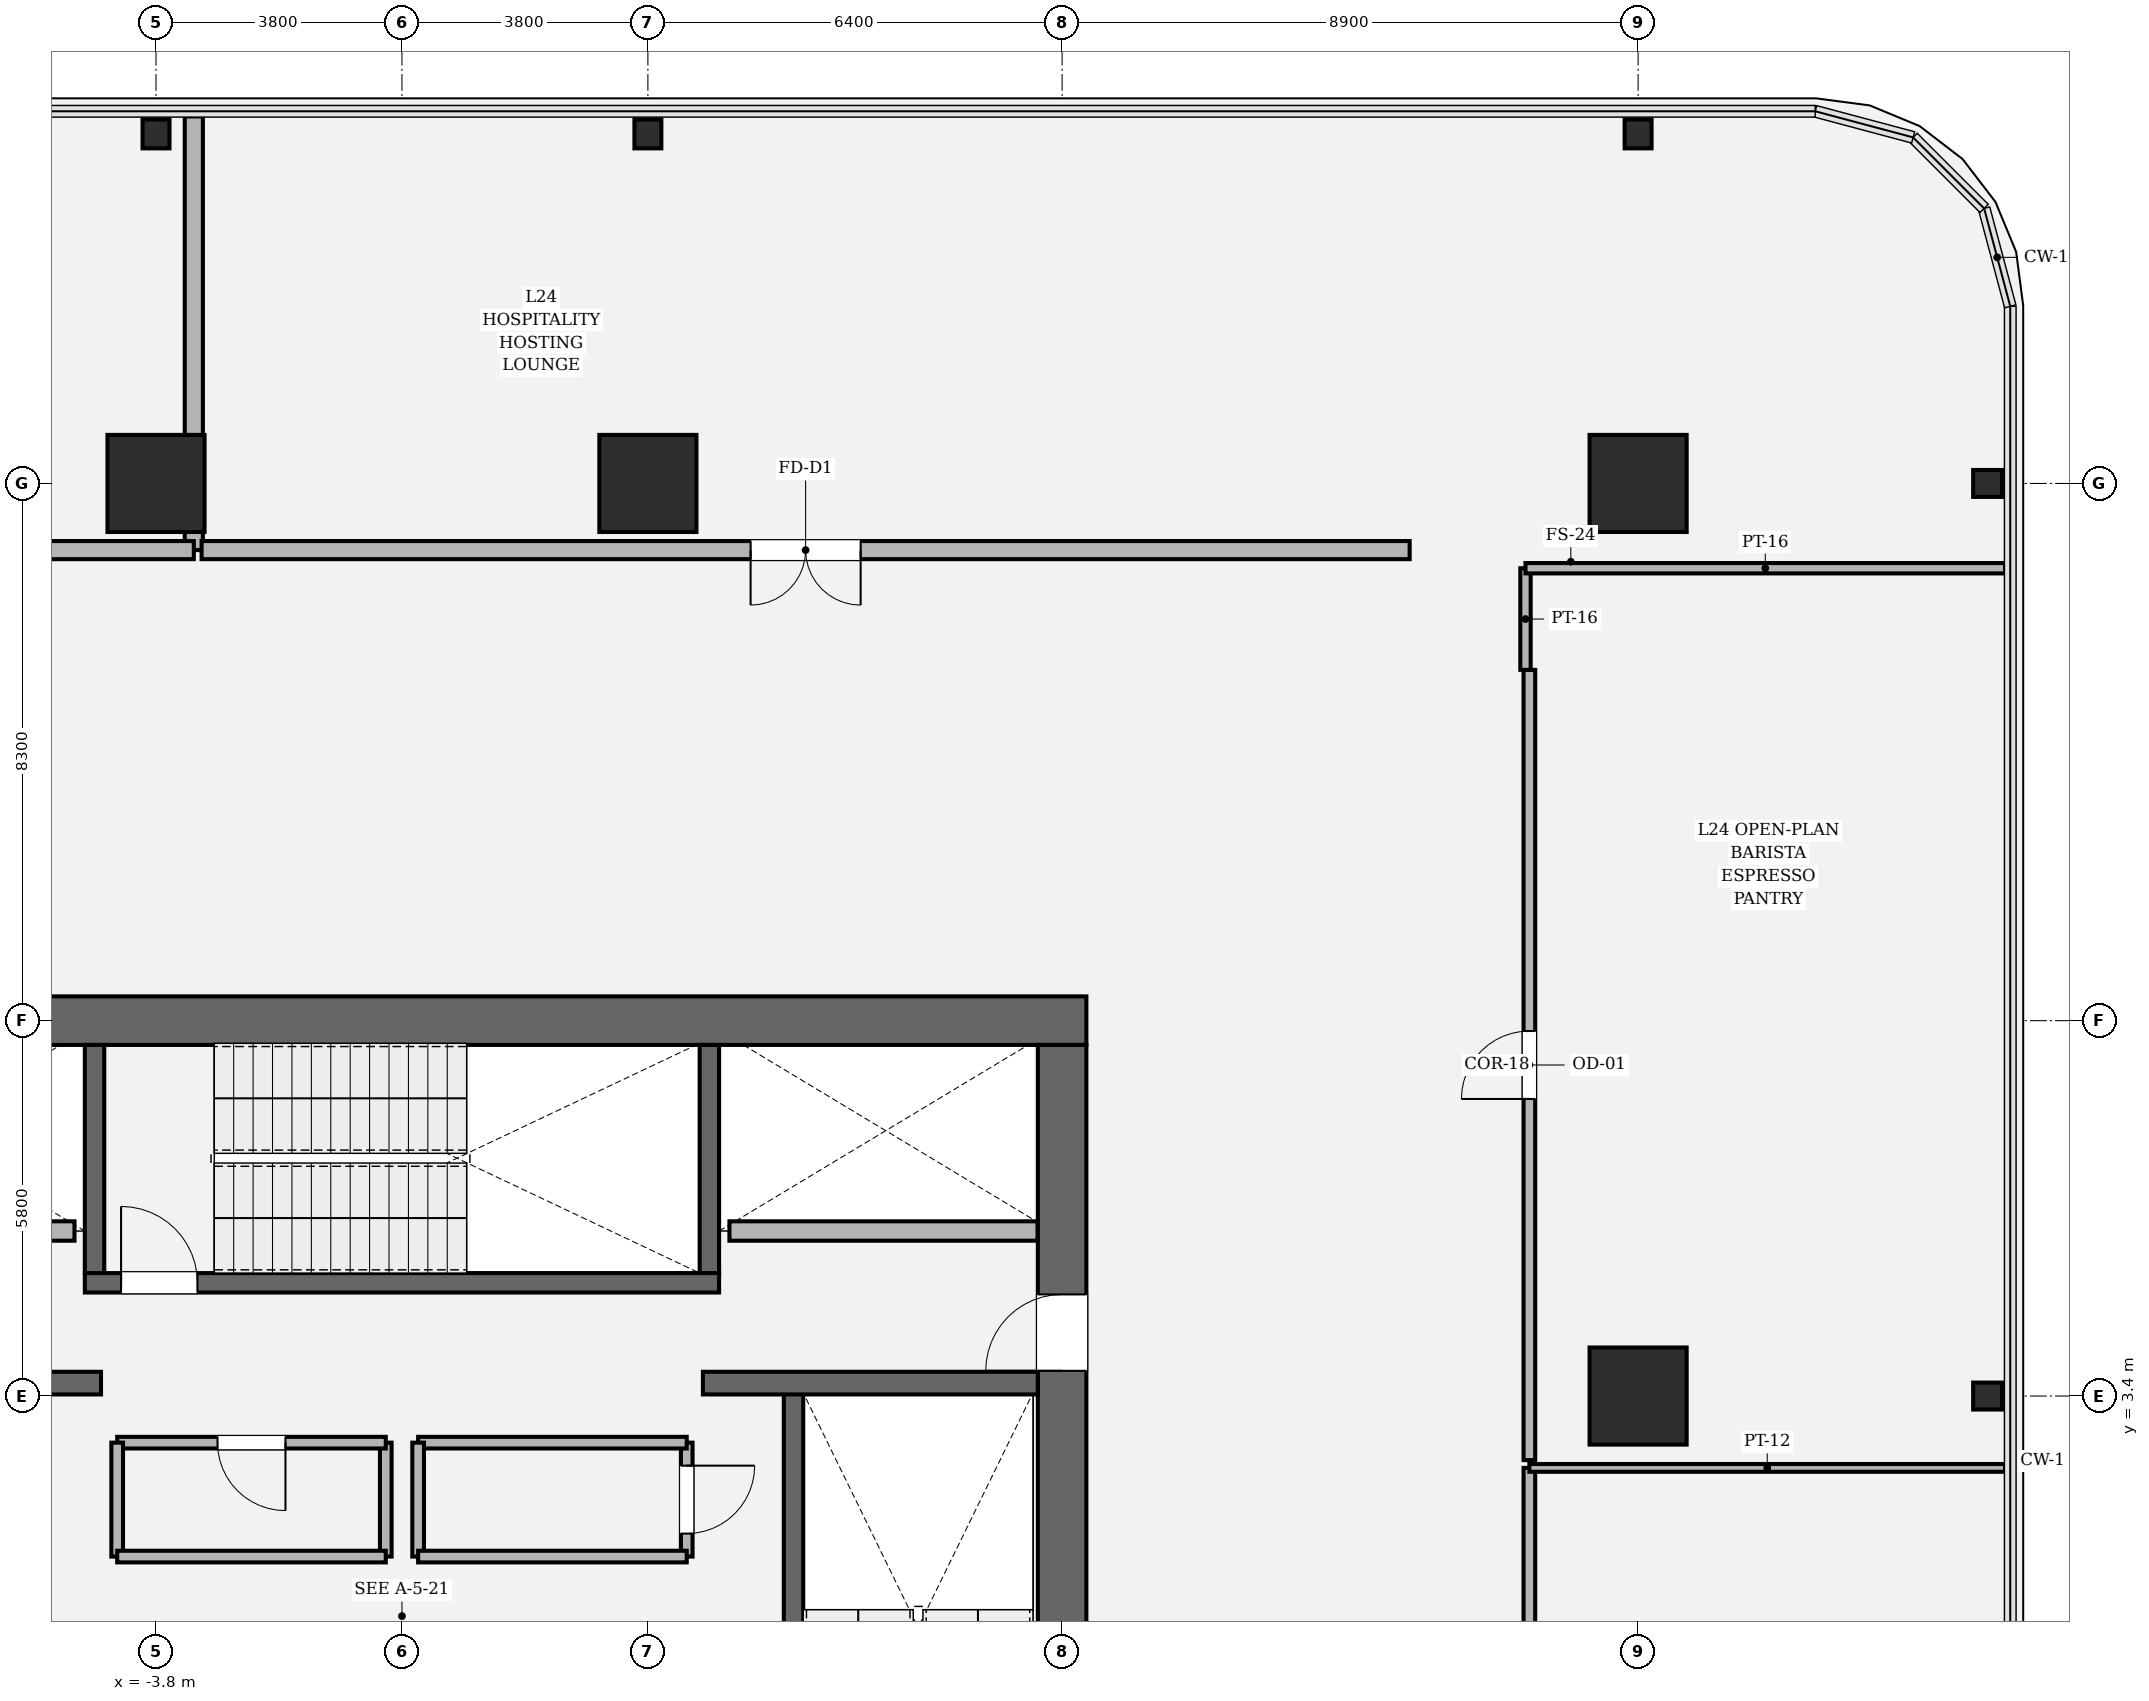
"""IFC4 building model, lengths in metres.
Left out: names, types, materials, properties, quantities, classifications, styles, units other than length and angle.
Written with IfcOpenShell. Run it as: python <this file> out.ifc"""

import sys

from ifc_helpers import new_model, si_unit, direction, frame, frame_2d, origin, origin_2d, place, context, subcontext, project, spatial, rectangle, hollow_rectangle, i_section, extrude, element, fill, save


model = new_model("IFC4")
c1 = context("Model", 3, precision=1e-05, world=origin(), true_north=direction((0.0, 1.0)))
c2 = subcontext(c1, "Body", "Model", "MODEL_VIEW")
j1 = project(units=[si_unit("LENGTHUNIT", "METRE"), si_unit("PLANEANGLEUNIT", "RADIAN")], contexts=[c1])
p1 = place(None, origin())
s1 = spatial("IfcSite", under=j1, at=p1, CompositionType="ELEMENT")
p2 = place(p1, origin())
s2 = spatial("IfcBuilding", under=s1, at=p2, CompositionType="ELEMENT")
p3 = place(p2, frame((0.0, 0.0, 105.15)))
s3 = spatial("IfcBuildingStorey", under=s2, at=p3, CompositionType="ELEMENT", Elevation=105.15)
p4 = place(p3, frame((-10.575, 9.2, 0.0), z_axis=(0.0, 0.0, 1.0), x_axis=(1.0, 0.0, 0.0)))
e1 = element("IfcWall", 1, at=p4, inside=s3, PredefinedType="SHEAR", context=c2, shape_type="SweptSolid", body=[
    extrude(rectangle(XDim=21.15, YDim=0.75, at=frame_2d((10.575, 0.0))), origin(), (0.0, 0.0, 1.0), 4.05),
])
p5 = place(p3, frame((10.2, 8.825, 0.0), z_axis=(0.0, 0.0, 1.0), x_axis=(0.0, -1.0, 0.0)))
e2 = element("IfcWall", 2, at=p5, inside=s3, PredefinedType="SHEAR", context=c2, shape_type="SweptSolid", body=[
    extrude(rectangle(XDim=17.65, YDim=0.75, at=frame_2d((8.825, 0.0))), origin(), (0.0, 0.0, 1.0), 4.05),
])
p6 = place(p5, frame((3.855, 0.0, 0.0)))
e3 = element("IfcOpeningElement", 3, at=p6, cuts=e2, PredefinedType="OPENING", context=c2, shape_type="SweptSolid", body=[
    extrude(rectangle(XDim=1.18, YDim=2.2, at=frame_2d((0.59, 1.1))), frame((0.0, 0.385, 0.0), z_axis=(0.0, -1.0, 0.0), x_axis=(1.0, 0.0, 0.0)), (0.0, 0.0, 1.0), 0.77),
])
p7 = place(p3, frame((6.05, 3.45, 0.0), z_axis=(0.0, 0.0, 1.0), x_axis=(0.0, -1.0, 0.0)))
e4 = element("IfcWall", 4, at=p7, inside=s3, PredefinedType="SOLIDWALL", context=c2, shape_type="SweptSolid", body=[
    extrude(rectangle(XDim=8.95, YDim=0.3, at=frame_2d((4.475, 0.0))), origin(), (0.0, 0.0, 1.0), 4.05),
])
for number, where, z_axis, x_axis in (
    (5, (-4.75, 5.3, 0.0), (0.0, 0.0, 1.0), (0.0, 1.0, 0.0)),
    (6, (4.75, 8.825, 0.0), (0.0, 0.0, 1.0), (0.0, -1.0, 0.0)),
):
    element("IfcWall", number, at=place(p3, frame(where, z_axis=z_axis, x_axis=x_axis)), inside=s3, PredefinedType="SOLIDWALL", context=c2, shape_type="SweptSolid", body=[
        extrude(rectangle(XDim=3.525, YDim=0.3, at=frame_2d((1.762, 0.0))), origin(), (0.0, 0.0, 1.0), 4.05),
    ])
p8 = place(p3, frame((-4.9, 5.15, 0.0), z_axis=(0.0, 0.0, 1.0), x_axis=(1.0, 0.0, 0.0)))
e7 = element("IfcWall", 7, at=p8, inside=s3, PredefinedType="SOLIDWALL", context=c2, shape_type="SweptSolid", body=[
    extrude(rectangle(XDim=9.8, YDim=0.3, at=frame_2d((4.9, 0.0))), origin(), (0.0, 0.0, 1.0), 4.05),
])
p9 = place(p8, frame((0.56, 0.0, 0.0)))
e8 = element("IfcOpeningElement", 8, at=p9, cuts=e7, PredefinedType="OPENING", context=c2, shape_type="SweptSolid", body=[
    extrude(rectangle(XDim=1.18, YDim=2.2, at=frame_2d((0.59, 1.1))), frame((0.0, 0.16, 0.0), z_axis=(0.0, -1.0, 0.0), x_axis=(1.0, 0.0, 0.0)), (0.0, 0.0, 1.0), 0.32),
])
for number, where, z_axis, x_axis in (
    (9, (-9.825, 3.6, 0.0), (0.0, 0.0, 1.0), (1.0, 0.0, 0.0)),
    (10, (4.65, 3.6, 0.0), (0.0, 0.0, 1.0), (1.0, 0.0, 0.0)),
):
    element("IfcWall", number, at=place(p3, frame(where, z_axis=z_axis, x_axis=x_axis)), inside=s3, PredefinedType="SOLIDWALL", context=c2, shape_type="SweptSolid", body=[
        extrude(rectangle(XDim=5.175, YDim=0.35, at=frame_2d((2.587, 0.0))), origin(), (0.0, 0.0, 1.0), 4.05),
    ])
for number, where, z_axis, x_axis in (
    (11, (19.1, 3.4, 0.0), (0.0, 0.0, 1.0), (1.0, 0.0, 0.0)),
    (12, (19.1, 17.5, 0.0), (0.0, 0.0, 1.0), (1.0, 0.0, 0.0)),
    (13, (3.8, 17.5, 0.0), (0.0, 0.0, 1.0), (1.0, 0.0, 0.0)),
    (14, (-3.8, 17.5, 0.0), (0.0, 0.0, 1.0), (1.0, 0.0, 0.0)),
):
    element("IfcColumn", number, at=place(p3, frame(where, z_axis=z_axis, x_axis=x_axis)), inside=s3, PredefinedType="COLUMN", context=c2, shape_type="SweptSolid", body=[
        extrude(hollow_rectangle(XDim=1.5, YDim=1.5, WallThickness=0.045, at=origin_2d()), origin(), (0.0, 0.0, 1.0), 4.05),
    ])
for number, where, z_axis, x_axis in (
    (15, (-3.8, 22.9, 0.0), (0.0, 0.0, 1.0), (1.0, 0.0, 0.0)),
    (16, (3.8, 22.9, 0.0), (0.0, 0.0, 1.0), (1.0, 0.0, 0.0)),
    (17, (19.1, 22.9, 0.0), (0.0, 0.0, 1.0), (1.0, 0.0, 0.0)),
    (18, (24.5, 3.4, 0.0), (0.0, 0.0, 1.0), (0.0, 1.0, 0.0)),
    (19, (24.5, 17.5, 0.0), (0.0, 0.0, 1.0), (0.0, 1.0, 0.0)),
):
    element("IfcColumn", number, at=place(p3, frame(where, z_axis=z_axis, x_axis=x_axis)), inside=s3, PredefinedType="COLUMN", context=c2, shape_type="SweptSolid", body=[
        extrude(i_section(OverallWidth=0.416, OverallDepth=0.446, WebThickness=0.039, FlangeThickness=0.062, FilletRadius=0.018, at=origin_2d()), origin(), (0.0, 0.0, 1.0), 4.048),
    ])
for number, where, z_axis, x_axis in (
    (20, (-9.82, 5.95, 0.0), (0.0, 0.0, 1.0), (1.0, 0.0, 0.0)),
    (21, (5.06, 5.95, 0.0), (0.0, 0.0, 1.0), (1.0, 0.0, 0.0)),
):
    element("IfcWall", number, at=place(p3, frame(where, z_axis=z_axis, x_axis=x_axis)), inside=s3, PredefinedType="SOLIDWALL", context=c2, shape_type="SweptSolid", body=[
        extrude(rectangle(XDim=4.76, YDim=0.3, at=frame_2d((2.38, 0.0))), origin(), (0.0, 0.0, 1.0), 3.81),
    ])
p10 = place(p3, frame((-0.25, 0.92, 0.0), z_axis=(0.0, 0.0, 1.0), x_axis=(0.0, 1.0, 0.0)))
e22 = element("IfcWall", 22, at=p10, inside=s3, PredefinedType="PARTITIONING", context=c2, shape_type="SweptSolid", body=[
    extrude(rectangle(XDim=1.76, YDim=0.18, at=frame_2d((0.88, 0.0))), origin(), (0.0, 0.0, 1.0), 3.81),
])
p11 = place(p3, frame((-0.25, 2.68, 0.0), z_axis=(0.0, 0.0, 1.0), x_axis=(-1.0, 0.0, 0.0)))
e23 = element("IfcWall", 23, at=p11, inside=s3, PredefinedType="PARTITIONING", context=c2, shape_type="SweptSolid", body=[
    extrude(rectangle(XDim=4.15, YDim=0.18, at=frame_2d((2.075, 0.0))), origin(), (0.0, 0.0, 1.0), 3.81),
])
p12 = place(p11, frame((1.55, 0.0, 0.0)))
e24 = element("IfcOpeningElement", 24, at=p12, cuts=e23, PredefinedType="OPENING", context=c2, shape_type="SweptSolid", body=[
    extrude(rectangle(XDim=1.05, YDim=2.2, at=frame_2d((0.525, 1.1))), frame((0.0, 0.1, 0.0), z_axis=(0.0, -1.0, 0.0), x_axis=(1.0, 0.0, 0.0)), (0.0, 0.0, 1.0), 0.2),
])
p13 = place(p3, frame((-4.4, 2.68, 0.0), z_axis=(0.0, 0.0, 1.0), x_axis=(0.0, -1.0, 0.0)))
e25 = element("IfcWall", 25, at=p13, inside=s3, PredefinedType="PARTITIONING", context=c2, shape_type="SweptSolid", body=[
    extrude(rectangle(XDim=1.76, YDim=0.18, at=frame_2d((0.88, 0.0))), origin(), (0.0, 0.0, 1.0), 3.81),
])
p14 = place(p3, frame((-4.4, 0.92, 0.0), z_axis=(0.0, 0.0, 1.0), x_axis=(1.0, 0.0, 0.0)))
e26 = element("IfcWall", 26, at=p14, inside=s3, PredefinedType="PARTITIONING", context=c2, shape_type="SweptSolid", body=[
    extrude(rectangle(XDim=4.15, YDim=0.18, at=frame_2d((2.075, 0.0))), origin(), (0.0, 0.0, 1.0), 3.81),
])
p15 = place(p3, frame((4.4, 0.92, 0.0), z_axis=(0.0, 0.0, 1.0), x_axis=(0.0, 1.0, 0.0)))
e27 = element("IfcWall", 27, at=p15, inside=s3, PredefinedType="PARTITIONING", context=c2, shape_type="SweptSolid", body=[
    extrude(rectangle(XDim=1.76, YDim=0.18, at=frame_2d((0.88, 0.0))), origin(), (0.0, 0.0, 1.0), 3.81),
])
p16 = place(p15, frame((0.355, 0.0, 0.0)))
e28 = element("IfcOpeningElement", 28, at=p16, cuts=e27, PredefinedType="OPENING", context=c2, shape_type="SweptSolid", body=[
    extrude(rectangle(XDim=1.05, YDim=2.2, at=frame_2d((0.525, 1.1))), frame((0.0, 0.1, 0.0), z_axis=(0.0, -1.0, 0.0), x_axis=(1.0, 0.0, 0.0)), (0.0, 0.0, 1.0), 0.2),
])
p17 = place(p3, frame((4.4, 2.68, 0.0), z_axis=(0.0, 0.0, 1.0), x_axis=(-1.0, 0.0, 0.0)))
e29 = element("IfcWall", 29, at=p17, inside=s3, PredefinedType="PARTITIONING", context=c2, shape_type="SweptSolid", body=[
    extrude(rectangle(XDim=4.15, YDim=0.18, at=frame_2d((2.075, 0.0))), origin(), (0.0, 0.0, 1.0), 3.81),
])
p18 = place(p3, frame((0.25, 2.68, 0.0), z_axis=(0.0, 0.0, 1.0), x_axis=(0.0, -1.0, 0.0)))
e30 = element("IfcWall", 30, at=p18, inside=s3, PredefinedType="PARTITIONING", context=c2, shape_type="SweptSolid", body=[
    extrude(rectangle(XDim=1.76, YDim=0.18, at=frame_2d((0.88, 0.0))), origin(), (0.0, 0.0, 1.0), 3.81),
])
p19 = place(p3, frame((0.25, 0.92, 0.0), z_axis=(0.0, 0.0, 1.0), x_axis=(1.0, 0.0, 0.0)))
e31 = element("IfcWall", 31, at=p19, inside=s3, PredefinedType="PARTITIONING", context=c2, shape_type="SweptSolid", body=[
    extrude(rectangle(XDim=4.15, YDim=0.18, at=frame_2d((2.075, 0.0))), origin(), (0.0, 0.0, 1.0), 3.81),
])
p20 = place(p3, frame((17.42, -11.49, 0.0), z_axis=(0.0, 0.0, 1.0), x_axis=(0.0, 1.0, 0.0)))
e32 = element("IfcWall", 32, at=p20, inside=s3, PredefinedType="PARTITIONING", context=c2, shape_type="SweptSolid", body=[
    extrude(rectangle(XDim=13.78, YDim=0.18, at=frame_2d((6.89, 0.0))), origin(), (0.0, 0.0, 1.0), 2.484),
])
p21 = place(p20, frame((5.74, 0.0, 0.0)))
e33 = element("IfcOpeningElement", 33, at=p21, cuts=e32, PredefinedType="OPENING", context=c2, shape_type="SweptSolid", body=[
    extrude(rectangle(XDim=1.4, YDim=2.25, at=frame_2d((0.7, 1.125))), frame((0.0, 0.1, 0.0), z_axis=(0.0, -1.0, 0.0), x_axis=(1.0, 0.0, 0.0)), (0.0, 0.0, 1.0), 0.2),
])
p22 = place(p3, frame((17.42, 2.29, 0.0), z_axis=(0.0, 0.0, 1.0), x_axis=(1.0, 0.0, 0.0)))
e34 = element("IfcWall", 34, at=p22, inside=s3, PredefinedType="PARTITIONING", context=c2, shape_type="SweptSolid", body=[
    extrude(rectangle(XDim=7.35, YDim=0.12, at=frame_2d((3.675, 0.0))), origin(), (0.0, 0.0, 1.0), 2.484),
])
p23 = place(p3, frame((17.42, 2.41, 0.0), z_axis=(0.0, 0.0, 1.0), x_axis=(0.0, 1.0, 0.0)))
e35 = element("IfcWall", 35, at=p23, inside=s3, PredefinedType="PARTITIONING", context=c2, shape_type="SweptSolid", body=[
    extrude(rectangle(XDim=12.21, YDim=0.18, at=frame_2d((6.105, 0.0))), origin(), (0.0, 0.0, 1.0), 2.484),
])
p24 = place(p23, frame((5.58, 0.0, 0.0)))
e36 = element("IfcOpeningElement", 36, at=p24, cuts=e35, PredefinedType="OPENING", context=c2, shape_type="SweptSolid", body=[
    extrude(rectangle(XDim=1.05, YDim=2.2, at=frame_2d((0.525, 1.1))), frame((0.0, 0.1, 0.0), z_axis=(0.0, -1.0, 0.0), x_axis=(1.0, 0.0, 0.0)), (0.0, 0.0, 1.0), 0.2),
])
p25 = place(p3, frame((17.36, 14.62, 0.0), z_axis=(0.0, 0.0, 1.0), x_axis=(0.0, 1.0, 0.0)))
e37 = element("IfcWall", 37, at=p25, inside=s3, PredefinedType="PARTITIONING", context=c2, shape_type="SweptSolid", body=[
    extrude(rectangle(XDim=1.57, YDim=0.16, at=frame_2d((0.785, 0.0))), origin(), (0.0, 0.0, 1.0), 3.81),
])
p26 = place(p3, frame((17.36, 16.19, 0.0), z_axis=(0.0, 0.0, 1.0), x_axis=(1.0, 0.0, 0.0)))
e38 = element("IfcWall", 38, at=p26, inside=s3, PredefinedType="PARTITIONING", context=c2, shape_type="SweptSolid", body=[
    extrude(rectangle(XDim=7.41, YDim=0.16, at=frame_2d((3.705, 0.0))), origin(), (0.0, 0.0, 1.0), 2.484),
])
p27 = place(p3, frame((-3.216, 23.17, 0.0), z_axis=(0.0, 0.0, 1.0), x_axis=(0.0, -1.0, 0.0)))
e39 = element("IfcWall", 39, at=p27, inside=s3, PredefinedType="SOLIDWALL", context=c2, shape_type="SweptSolid", body=[
    extrude(rectangle(XDim=6.7, YDim=0.28, at=frame_2d((3.35, 0.0))), origin(), (0.0, 0.0, 1.0), 2.484),
])
p28 = place(p3, frame((-3.216, 16.47, 0.0), z_axis=(0.0, 0.0, 1.0), x_axis=(-1.0, 0.0, 0.0)))
e40 = element("IfcWall", 40, at=p28, inside=s3, PredefinedType="SOLIDWALL", context=c2, shape_type="SweptSolid", body=[
    extrude(rectangle(XDim=9.554, YDim=0.28, at=frame_2d((4.777, 0.0))), origin(), (0.0, 0.0, 1.0), 2.484),
])
p29 = place(p28, frame((3.927, 0.0, 0.0)))
e41 = element("IfcOpeningElement", 41, at=p29, cuts=e40, PredefinedType="OPENING", context=c2, shape_type="SweptSolid", body=[
    extrude(rectangle(XDim=1.7, YDim=2.3, at=frame_2d((0.85, 1.15))), frame((0.0, 0.15, 0.0), z_axis=(0.0, -1.0, 0.0), x_axis=(1.0, 0.0, 0.0)), (0.0, 0.0, 1.0), 0.3),
])
p30 = place(p3, frame((15.57, 16.47, 0.0), z_axis=(0.0, 0.0, 1.0), x_axis=(-1.0, 0.0, 0.0)))
e42 = element("IfcWall", 42, at=p30, inside=s3, PredefinedType="SOLIDWALL", context=c2, shape_type="SweptSolid", body=[
    extrude(rectangle(XDim=18.666, YDim=0.28, at=frame_2d((9.333, 0.0))), origin(), (0.0, 0.0, 1.0), 2.484),
])
p31 = place(p30, frame((8.483, 0.0, 0.0)))
e43 = element("IfcOpeningElement", 43, at=p31, cuts=e42, PredefinedType="OPENING", context=c2, shape_type="SweptSolid", body=[
    extrude(rectangle(XDim=1.7, YDim=2.3, at=frame_2d((0.85, 1.15))), frame((0.0, 0.15, 0.0), z_axis=(0.0, -1.0, 0.0), x_axis=(1.0, 0.0, 0.0)), (0.0, 0.0, 1.0), 0.3),
])
p32 = place(p9, origin())
e44 = element("IfcDoor", 44, at=p32, inside=s3, OperationType="SINGLE_SWING_LEFT", PredefinedType="DOOR", context=c2, shape_type="SweptSolid", body=[
    extrude(rectangle(XDim=1.18, YDim=2.2, at=frame_2d((0.59, 1.1))), frame((0.0, 0.025, 0.0), z_axis=(0.0, -1.0, 0.0), x_axis=(1.0, 0.0, 0.0)), (0.0, 0.0, 1.0), 0.05),
])
fill(e8, e44)
p33 = place(p6, origin())
e45 = element("IfcDoor", 45, at=p33, inside=s3, OperationType="SINGLE_SWING_RIGHT", PredefinedType="DOOR", context=c2, shape_type="SweptSolid", body=[
    extrude(rectangle(XDim=1.18, YDim=2.2, at=frame_2d((0.59, 1.1))), frame((0.0, 0.025, 0.0), z_axis=(0.0, -1.0, 0.0), x_axis=(1.0, 0.0, 0.0)), (0.0, 0.0, 1.0), 0.05),
])
fill(e3, e45)
p34 = place(p12, origin())
e46 = element("IfcDoor", 46, at=p34, inside=s3, OperationType="SINGLE_SWING_LEFT", PredefinedType="DOOR", context=c2, shape_type="SweptSolid", body=[
    extrude(rectangle(XDim=1.05, YDim=2.2, at=frame_2d((0.525, 1.1))), frame((0.0, 0.025, 0.0), z_axis=(0.0, -1.0, 0.0), x_axis=(1.0, 0.0, 0.0)), (0.0, 0.0, 1.0), 0.05),
])
fill(e24, e46)
p35 = place(p16, origin())
e47 = element("IfcDoor", 47, at=p35, inside=s3, OperationType="SINGLE_SWING_RIGHT", PredefinedType="DOOR", context=c2, shape_type="SweptSolid", body=[
    extrude(rectangle(XDim=1.05, YDim=2.2, at=frame_2d((0.525, 1.1))), frame((0.0, 0.025, 0.0), z_axis=(0.0, -1.0, 0.0), x_axis=(1.0, 0.0, 0.0)), (0.0, 0.0, 1.0), 0.05),
])
fill(e28, e47)
p36 = place(p24, origin())
e48 = element("IfcDoor", 48, at=p36, inside=s3, OperationType="SINGLE_SWING_LEFT", PredefinedType="DOOR", context=c2, shape_type="SweptSolid", body=[
    extrude(rectangle(XDim=1.05, YDim=2.2, at=frame_2d((0.525, 1.1))), frame((0.0, 0.025, 0.0), z_axis=(0.0, -1.0, 0.0), x_axis=(1.0, 0.0, 0.0)), (0.0, 0.0, 1.0), 0.05),
])
fill(e36, e48)
p37 = place(p31, origin())
e49 = element("IfcDoor", 49, at=p37, inside=s3, OperationType="DOUBLE_DOOR_SINGLE_SWING", PredefinedType="DOOR", context=c2, shape_type="SweptSolid", body=[
    extrude(rectangle(XDim=1.7, YDim=2.3, at=frame_2d((0.85, 1.15))), frame((0.0, 0.025, 0.0), z_axis=(0.0, -1.0, 0.0), x_axis=(1.0, 0.0, 0.0)), (0.0, 0.0, 1.0), 0.05),
])
fill(e43, e49)
save(model, sys.argv[1])
